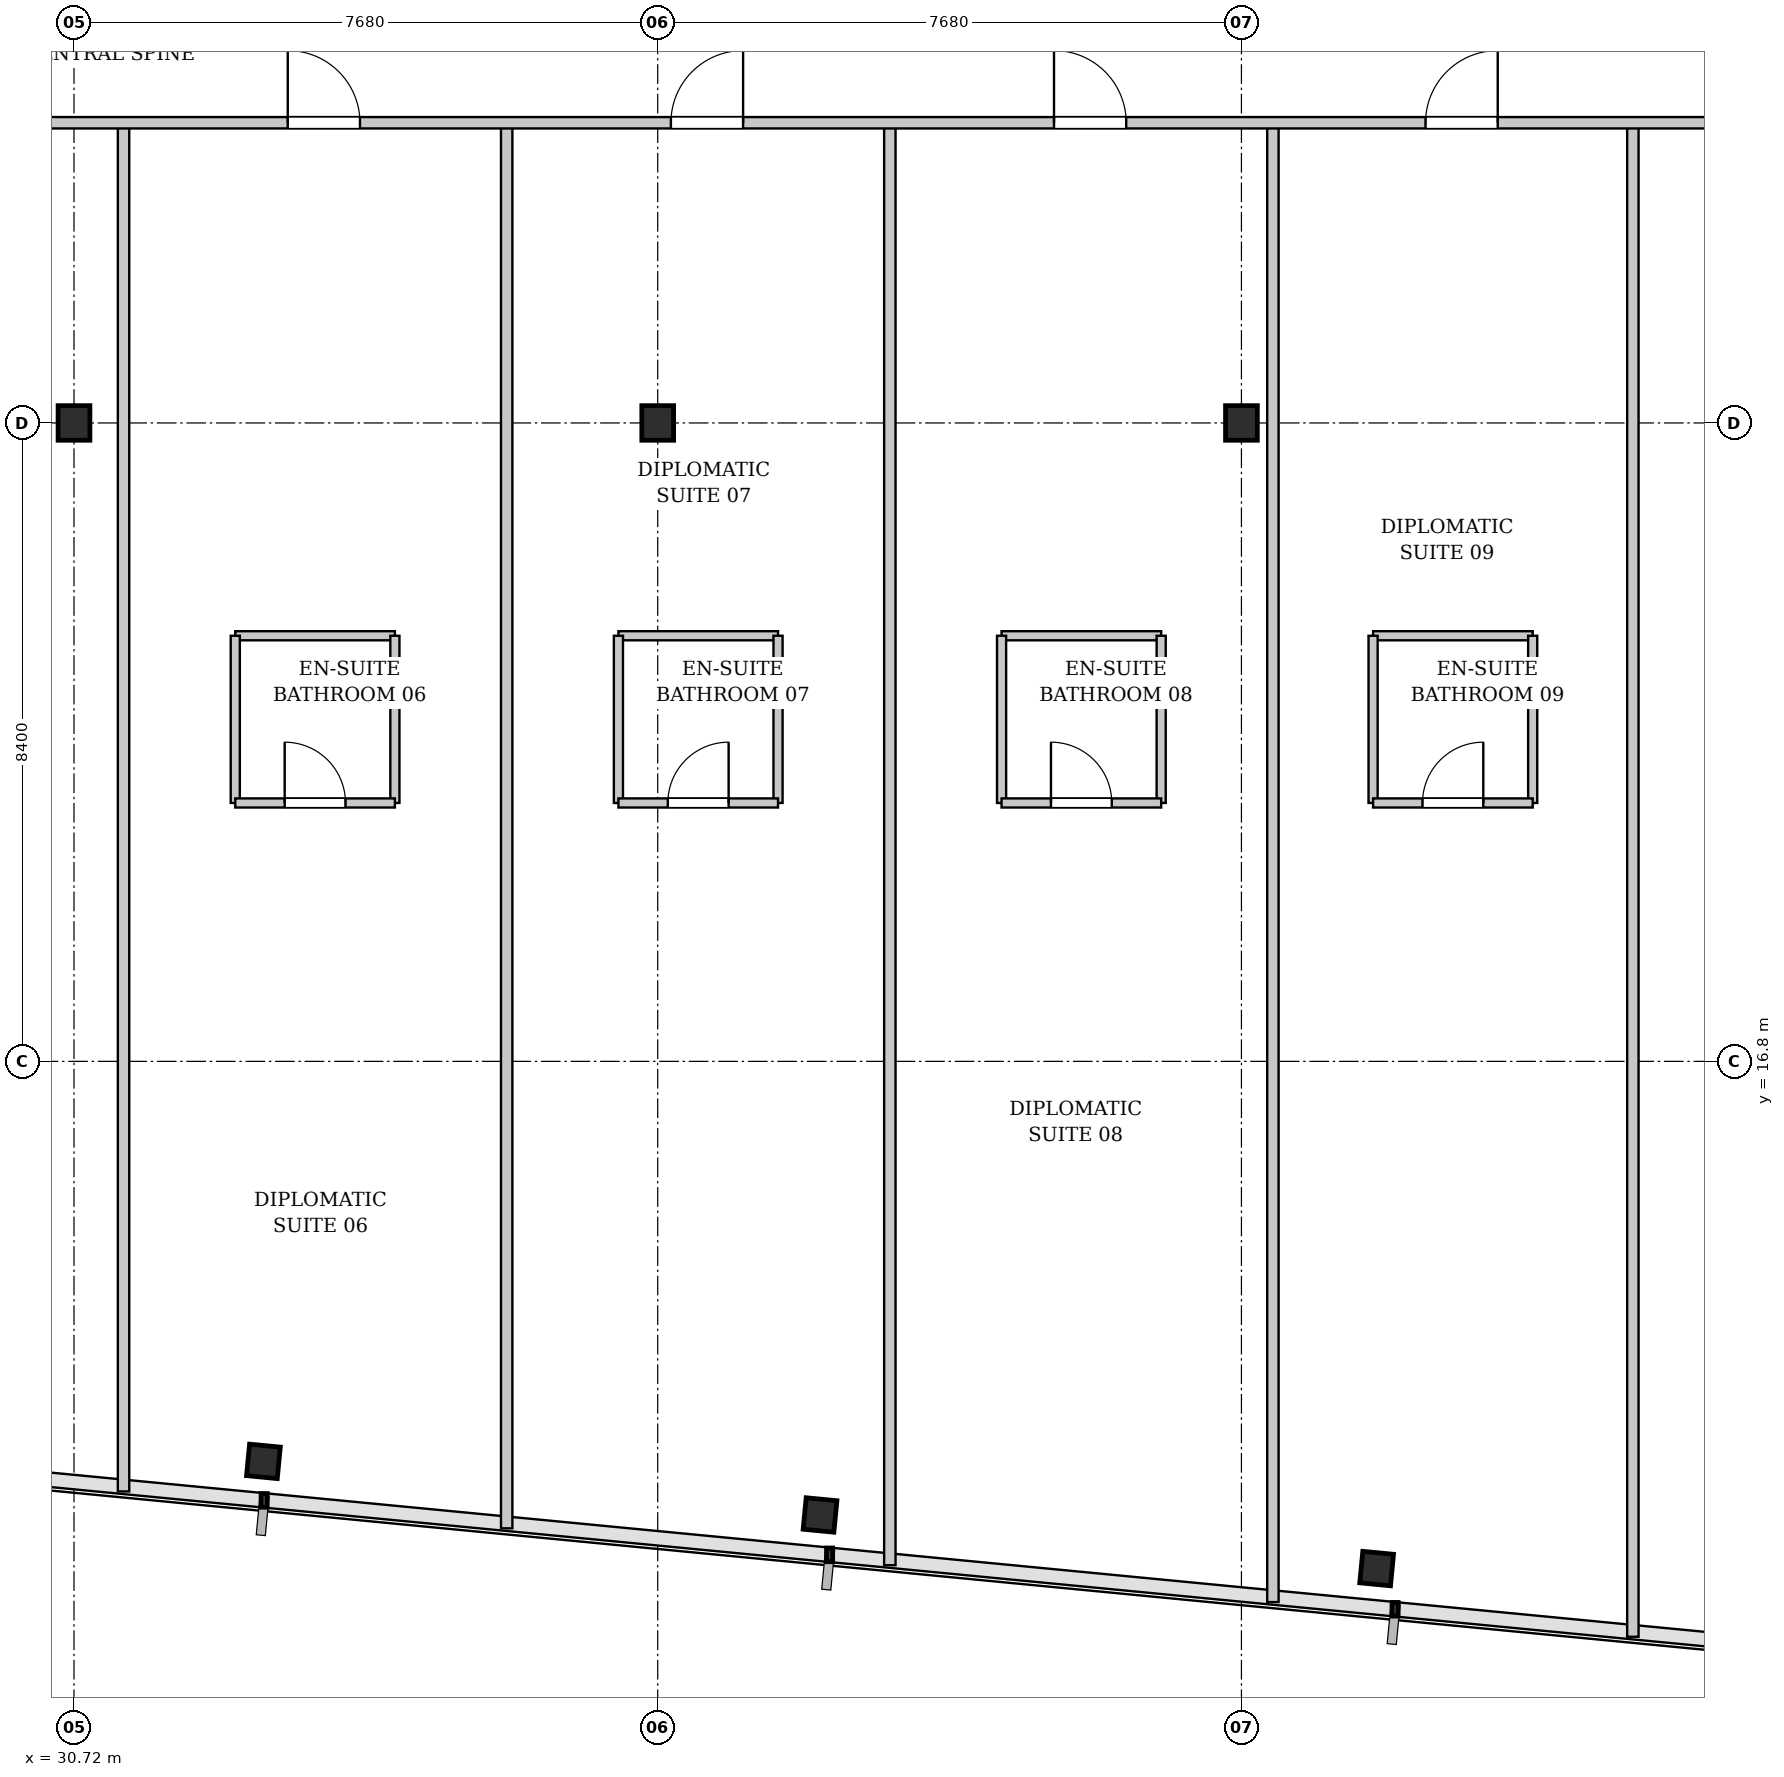
"""IFC4 building model, lengths in metres.
Left out: names, types, materials, properties, quantities, classifications, styles, units other than length and angle.
Written with IfcOpenShell. Run it as: python <this file> out.ifc"""

import sys

from ifc_helpers import new_model, si_unit, direction, frame, frame_2d, origin, origin_2d, place, context, subcontext, project, spatial, rectangle, i_section, extrude, element, fill, save


model = new_model("IFC4")
c1 = context("Model", 3, precision=1e-05, world=origin(), true_north=direction((0.0, 1.0)))
c2 = subcontext(c1, "Body", "Model", "MODEL_VIEW")
j1 = project(units=[si_unit("LENGTHUNIT", "METRE"), si_unit("PLANEANGLEUNIT", "RADIAN")], contexts=[c1])
p1 = place(None, origin())
s1 = spatial("IfcSite", under=j1, at=p1, CompositionType="ELEMENT")
p2 = place(p1, origin())
s2 = spatial("IfcBuilding", under=s1, at=p2, CompositionType="ELEMENT")
p3 = place(p2, frame((0.0, 0.0, 178.7)))
s3 = spatial("IfcBuildingStorey", under=s2, at=p3, CompositionType="ELEMENT", Elevation=178.7)
for number, where, z_axis, x_axis in (
    (1, (30.72, 25.2, 0.0), (0.0, 0.0, 1.0), (1.0, 0.0, 0.0)),
    (2, (38.4, 25.2, 0.0), (0.0, 0.0, 1.0), (1.0, 0.0, 0.0)),
    (3, (46.08, 25.2, 0.0), (0.0, 0.0, 1.0), (1.0, 0.0, 0.0)),
):
    element("IfcColumn", number, at=place(p3, frame(where, z_axis=z_axis, x_axis=x_axis)), inside=s3, PredefinedType="COLUMN", context=c2, shape_type="SweptSolid", body=[
        extrude(i_section(OverallWidth=0.418, OverallDepth=0.455, WebThickness=0.042, FlangeThickness=0.068, FilletRadius=0.015, at=origin_2d()), origin(), (0.0, 0.0, 1.0), 3.3),
    ])
for number, where, z_axis, x_axis in (
    (4, (33.212, 11.537, 0.0), (0.0, 0.0, 1.0), (0.995, -0.096, 0.0)),
    (5, (40.536, 10.832, 0.0), (0.0, 0.0, 1.0), (0.995, -0.096, 0.0)),
    (6, (47.859, 10.126, 0.0), (0.0, 0.0, 1.0), (0.995, -0.096, 0.0)),
):
    element("IfcColumn", number, at=place(p3, frame(where, z_axis=z_axis, x_axis=x_axis)), inside=s3, PredefinedType="COLUMN", context=c2, shape_type="SweptSolid", body=[
        extrude(i_section(OverallWidth=0.406, OverallDepth=0.416, WebThickness=0.03, FlangeThickness=0.048, FilletRadius=0.015, at=origin_2d()), origin(), (0.0, 0.0, 1.0), 3.3),
    ])
p4 = place(p3, frame((32.842, 22.4, 0.0), z_axis=(0.0, 0.0, 1.0), x_axis=(1.0, 0.0, 0.0)))
e7 = element("IfcWall", 7, at=p4, inside=s3, PredefinedType="PARTITIONING", context=c2, shape_type="SweptSolid", body=[
    extrude(rectangle(XDim=2.1, YDim=0.12, at=frame_2d((1.05, 0.0))), origin(), (0.0, 0.0, 1.0), 3.08),
])
for number, where, z_axis, x_axis in (
    (8, (32.842, 20.2, 0.0), (0.0, 0.0, 1.0), (0.0, 1.0, 0.0)),
    (9, (34.942, 20.2, 0.0), (0.0, 0.0, 1.0), (0.0, 1.0, 0.0)),
):
    element("IfcWall", number, at=place(p3, frame(where, z_axis=z_axis, x_axis=x_axis)), inside=s3, PredefinedType="PARTITIONING", context=c2, shape_type="SweptSolid", body=[
        extrude(rectangle(XDim=2.2, YDim=0.12, at=frame_2d((1.1, 0.0))), origin(), (0.0, 0.0, 1.0), 3.08),
    ])
p5 = place(p3, frame((32.842, 20.2, 0.0), z_axis=(0.0, 0.0, 1.0), x_axis=(1.0, 0.0, 0.0)))
e10 = element("IfcWall", 10, at=p5, inside=s3, PredefinedType="PARTITIONING", context=c2, shape_type="SweptSolid", body=[
    extrude(rectangle(XDim=2.1, YDim=0.12, at=frame_2d((1.05, 0.0))), origin(), (0.0, 0.0, 1.0), 3.08),
])
p6 = place(p5, frame((0.65, 0.0, 0.0)))
e11 = element("IfcOpeningElement", 11, at=p6, cuts=e10, PredefinedType="OPENING", context=c2, shape_type="SweptSolid", body=[
    extrude(rectangle(XDim=0.8, YDim=2.1, at=frame_2d((0.4, 1.05))), frame((0.0, 0.07, 0.0), z_axis=(0.0, -1.0, 0.0), x_axis=(1.0, 0.0, 0.0)), (0.0, 0.0, 1.0), 0.14),
])
p7 = place(p3, frame((31.372, 11.141, 0.0), z_axis=(0.0, 0.0, 1.0), x_axis=(0.0, 1.0, 0.0)))
e12 = element("IfcWall", 12, at=p7, inside=s3, PredefinedType="PARTITIONING", context=c2, shape_type="SweptSolid", body=[
    extrude(rectangle(XDim=18.029, YDim=0.15, at=frame_2d((9.014, 0.0))), origin(), (0.0, 0.0, 1.0), 2.475),
])
p8 = place(p3, frame((37.883, 22.4, 0.0), z_axis=(0.0, 0.0, 1.0), x_axis=(1.0, 0.0, 0.0)))
e13 = element("IfcWall", 13, at=p8, inside=s3, PredefinedType="PARTITIONING", context=c2, shape_type="SweptSolid", body=[
    extrude(rectangle(XDim=2.1, YDim=0.12, at=frame_2d((1.05, 0.0))), origin(), (0.0, 0.0, 1.0), 3.08),
])
for number, where, z_axis, x_axis in (
    (14, (37.883, 20.2, 0.0), (0.0, 0.0, 1.0), (0.0, 1.0, 0.0)),
    (15, (39.983, 20.2, 0.0), (0.0, 0.0, 1.0), (0.0, 1.0, 0.0)),
):
    element("IfcWall", number, at=place(p3, frame(where, z_axis=z_axis, x_axis=x_axis)), inside=s3, PredefinedType="PARTITIONING", context=c2, shape_type="SweptSolid", body=[
        extrude(rectangle(XDim=2.2, YDim=0.12, at=frame_2d((1.1, 0.0))), origin(), (0.0, 0.0, 1.0), 3.08),
    ])
p9 = place(p3, frame((37.883, 20.2, 0.0), z_axis=(0.0, 0.0, 1.0), x_axis=(1.0, 0.0, 0.0)))
e16 = element("IfcWall", 16, at=p9, inside=s3, PredefinedType="PARTITIONING", context=c2, shape_type="SweptSolid", body=[
    extrude(rectangle(XDim=2.1, YDim=0.12, at=frame_2d((1.05, 0.0))), origin(), (0.0, 0.0, 1.0), 3.08),
])
p10 = place(p9, frame((0.65, 0.0, 0.0)))
e17 = element("IfcOpeningElement", 17, at=p10, cuts=e16, PredefinedType="OPENING", context=c2, shape_type="SweptSolid", body=[
    extrude(rectangle(XDim=0.8, YDim=2.1, at=frame_2d((0.4, 1.05))), frame((0.0, 0.07, 0.0), z_axis=(0.0, -1.0, 0.0), x_axis=(1.0, 0.0, 0.0)), (0.0, 0.0, 1.0), 0.14),
])
p11 = place(p3, frame((36.413, 10.656, 0.0), z_axis=(0.0, 0.0, 1.0), x_axis=(0.0, 1.0, 0.0)))
e18 = element("IfcWall", 18, at=p11, inside=s3, PredefinedType="PARTITIONING", context=c2, shape_type="SweptSolid", body=[
    extrude(rectangle(XDim=18.514, YDim=0.15, at=frame_2d((9.257, 0.0))), origin(), (0.0, 0.0, 1.0), 3.08),
])
p12 = place(p3, frame((42.924, 22.4, 0.0), z_axis=(0.0, 0.0, 1.0), x_axis=(1.0, 0.0, 0.0)))
e19 = element("IfcWall", 19, at=p12, inside=s3, PredefinedType="PARTITIONING", context=c2, shape_type="SweptSolid", body=[
    extrude(rectangle(XDim=2.1, YDim=0.12, at=frame_2d((1.05, 0.0))), origin(), (0.0, 0.0, 1.0), 3.08),
])
for number, where, z_axis, x_axis in (
    (20, (42.924, 20.2, 0.0), (0.0, 0.0, 1.0), (0.0, 1.0, 0.0)),
    (21, (45.024, 20.2, 0.0), (0.0, 0.0, 1.0), (0.0, 1.0, 0.0)),
):
    element("IfcWall", number, at=place(p3, frame(where, z_axis=z_axis, x_axis=x_axis)), inside=s3, PredefinedType="PARTITIONING", context=c2, shape_type="SweptSolid", body=[
        extrude(rectangle(XDim=2.2, YDim=0.12, at=frame_2d((1.1, 0.0))), origin(), (0.0, 0.0, 1.0), 3.08),
    ])
p13 = place(p3, frame((42.924, 20.2, 0.0), z_axis=(0.0, 0.0, 1.0), x_axis=(1.0, 0.0, 0.0)))
e22 = element("IfcWall", 22, at=p13, inside=s3, PredefinedType="PARTITIONING", context=c2, shape_type="SweptSolid", body=[
    extrude(rectangle(XDim=2.1, YDim=0.12, at=frame_2d((1.05, 0.0))), origin(), (0.0, 0.0, 1.0), 3.08),
])
p14 = place(p13, frame((0.65, 0.0, 0.0)))
e23 = element("IfcOpeningElement", 23, at=p14, cuts=e22, PredefinedType="OPENING", context=c2, shape_type="SweptSolid", body=[
    extrude(rectangle(XDim=0.8, YDim=2.1, at=frame_2d((0.4, 1.05))), frame((0.0, 0.07, 0.0), z_axis=(0.0, -1.0, 0.0), x_axis=(1.0, 0.0, 0.0)), (0.0, 0.0, 1.0), 0.14),
])
p15 = place(p3, frame((41.454, 10.17, 0.0), z_axis=(0.0, 0.0, 1.0), x_axis=(0.0, 1.0, 0.0)))
e24 = element("IfcWall", 24, at=p15, inside=s3, PredefinedType="PARTITIONING", context=c2, shape_type="SweptSolid", body=[
    extrude(rectangle(XDim=19.0, YDim=0.15, at=frame_2d((9.5, 0.0))), origin(), (0.0, 0.0, 1.0), 3.08),
])
p16 = place(p3, frame((47.812, 22.4, 0.0), z_axis=(0.0, 0.0, 1.0), x_axis=(1.0, 0.0, 0.0)))
e25 = element("IfcWall", 25, at=p16, inside=s3, PredefinedType="PARTITIONING", context=c2, shape_type="SweptSolid", body=[
    extrude(rectangle(XDim=2.1, YDim=0.12, at=frame_2d((1.05, 0.0))), origin(), (0.0, 0.0, 1.0), 3.08),
])
for number, where, z_axis, x_axis in (
    (26, (47.812, 20.2, 0.0), (0.0, 0.0, 1.0), (0.0, 1.0, 0.0)),
    (27, (49.912, 20.2, 0.0), (0.0, 0.0, 1.0), (0.0, 1.0, 0.0)),
):
    element("IfcWall", number, at=place(p3, frame(where, z_axis=z_axis, x_axis=x_axis)), inside=s3, PredefinedType="PARTITIONING", context=c2, shape_type="SweptSolid", body=[
        extrude(rectangle(XDim=2.2, YDim=0.12, at=frame_2d((1.1, 0.0))), origin(), (0.0, 0.0, 1.0), 3.08),
    ])
p17 = place(p3, frame((47.812, 20.2, 0.0), z_axis=(0.0, 0.0, 1.0), x_axis=(1.0, 0.0, 0.0)))
e28 = element("IfcWall", 28, at=p17, inside=s3, PredefinedType="PARTITIONING", context=c2, shape_type="SweptSolid", body=[
    extrude(rectangle(XDim=2.1, YDim=0.12, at=frame_2d((1.05, 0.0))), origin(), (0.0, 0.0, 1.0), 3.08),
])
p18 = place(p17, frame((0.65, 0.0, 0.0)))
e29 = element("IfcOpeningElement", 29, at=p18, cuts=e28, PredefinedType="OPENING", context=c2, shape_type="SweptSolid", body=[
    extrude(rectangle(XDim=0.8, YDim=2.1, at=frame_2d((0.4, 1.05))), frame((0.0, 0.07, 0.0), z_axis=(0.0, -1.0, 0.0), x_axis=(1.0, 0.0, 0.0)), (0.0, 0.0, 1.0), 0.14),
])
p19 = place(p3, frame((46.494, 9.685, 0.0), z_axis=(0.0, 0.0, 1.0), x_axis=(0.0, 1.0, 0.0)))
e30 = element("IfcWall", 30, at=p19, inside=s3, PredefinedType="PARTITIONING", context=c2, shape_type="SweptSolid", body=[
    extrude(rectangle(XDim=19.485, YDim=0.15, at=frame_2d((9.742, 0.0))), origin(), (0.0, 0.0, 1.0), 2.475),
])
p20 = place(p3, frame((51.23, 9.229, 0.0), z_axis=(0.0, 0.0, 1.0), x_axis=(0.0, 1.0, 0.0)))
e31 = element("IfcWall", 31, at=p20, inside=s3, PredefinedType="PARTITIONING", context=c2, shape_type="SweptSolid", body=[
    extrude(rectangle(XDim=19.941, YDim=0.15, at=frame_2d((9.97, 0.0))), origin(), (0.0, 0.0, 1.0), 3.08),
])
p21 = place(p3, frame((2.46, 29.15, 0.0), z_axis=(0.0, 0.0, 1.0), x_axis=(1.0, 0.0, 0.0)))
e32 = element("IfcWall", 32, at=p21, inside=s3, PredefinedType="PARTITIONING", context=c2, shape_type="SweptSolid", body=[
    extrude(rectangle(XDim=57.505, YDim=0.15, at=frame_2d((28.752, 0.0))), origin(), (0.0, 0.0, 1.0), 2.475),
])
p22 = place(p21, frame((7.987, 0.0, 0.0)))
e33 = element("IfcOpeningElement", 33, at=p22, cuts=e32, PredefinedType="OPENING", context=c2, shape_type="SweptSolid", body=[
    extrude(rectangle(XDim=0.95, YDim=2.15, at=frame_2d((0.475, 1.075))), frame((0.0, 0.085, 0.0), z_axis=(0.0, -1.0, 0.0), x_axis=(1.0, 0.0, 0.0)), (0.0, 0.0, 1.0), 0.17),
])
p23 = place(p21, frame((11.483, 0.0, 0.0)))
e34 = element("IfcOpeningElement", 34, at=p23, cuts=e32, PredefinedType="OPENING", context=c2, shape_type="SweptSolid", body=[
    extrude(rectangle(XDim=0.95, YDim=2.15, at=frame_2d((0.475, 1.075))), frame((0.0, 0.085, 0.0), z_axis=(0.0, -1.0, 0.0), x_axis=(1.0, 0.0, 0.0)), (0.0, 0.0, 1.0), 0.17),
])
p24 = place(p21, frame((15.951, 0.0, 0.0)))
e35 = element("IfcOpeningElement", 35, at=p24, cuts=e32, PredefinedType="OPENING", context=c2, shape_type="SweptSolid", body=[
    extrude(rectangle(XDim=0.95, YDim=2.15, at=frame_2d((0.475, 1.075))), frame((0.0, 0.085, 0.0), z_axis=(0.0, -1.0, 0.0), x_axis=(1.0, 0.0, 0.0)), (0.0, 0.0, 1.0), 0.17),
])
p25 = place(p21, frame((20.991, 0.0, 0.0)))
e36 = element("IfcOpeningElement", 36, at=p25, cuts=e32, PredefinedType="OPENING", context=c2, shape_type="SweptSolid", body=[
    extrude(rectangle(XDim=0.95, YDim=2.15, at=frame_2d((0.475, 1.075))), frame((0.0, 0.085, 0.0), z_axis=(0.0, -1.0, 0.0), x_axis=(1.0, 0.0, 0.0)), (0.0, 0.0, 1.0), 0.17),
])
p26 = place(p21, frame((26.032, 0.0, 0.0)))
e37 = element("IfcOpeningElement", 37, at=p26, cuts=e32, PredefinedType="OPENING", context=c2, shape_type="SweptSolid", body=[
    extrude(rectangle(XDim=0.95, YDim=2.15, at=frame_2d((0.475, 1.075))), frame((0.0, 0.085, 0.0), z_axis=(0.0, -1.0, 0.0), x_axis=(1.0, 0.0, 0.0)), (0.0, 0.0, 1.0), 0.17),
])
p27 = place(p21, frame((31.072, 0.0, 0.0)))
e38 = element("IfcOpeningElement", 38, at=p27, cuts=e32, PredefinedType="OPENING", context=c2, shape_type="SweptSolid", body=[
    extrude(rectangle(XDim=0.95, YDim=2.15, at=frame_2d((0.475, 1.075))), frame((0.0, 0.085, 0.0), z_axis=(0.0, -1.0, 0.0), x_axis=(1.0, 0.0, 0.0)), (0.0, 0.0, 1.0), 0.17),
])
p28 = place(p21, frame((36.113, 0.0, 0.0)))
e39 = element("IfcOpeningElement", 39, at=p28, cuts=e32, PredefinedType="OPENING", context=c2, shape_type="SweptSolid", body=[
    extrude(rectangle(XDim=0.95, YDim=2.15, at=frame_2d((0.475, 1.075))), frame((0.0, 0.085, 0.0), z_axis=(0.0, -1.0, 0.0), x_axis=(1.0, 0.0, 0.0)), (0.0, 0.0, 1.0), 0.17),
])
p29 = place(p21, frame((41.154, 0.0, 0.0)))
e40 = element("IfcOpeningElement", 40, at=p29, cuts=e32, PredefinedType="OPENING", context=c2, shape_type="SweptSolid", body=[
    extrude(rectangle(XDim=0.95, YDim=2.15, at=frame_2d((0.475, 1.075))), frame((0.0, 0.085, 0.0), z_axis=(0.0, -1.0, 0.0), x_axis=(1.0, 0.0, 0.0)), (0.0, 0.0, 1.0), 0.17),
])
p30 = place(p21, frame((46.042, 0.0, 0.0)))
e41 = element("IfcOpeningElement", 41, at=p30, cuts=e32, PredefinedType="OPENING", context=c2, shape_type="SweptSolid", body=[
    extrude(rectangle(XDim=0.95, YDim=2.15, at=frame_2d((0.475, 1.075))), frame((0.0, 0.085, 0.0), z_axis=(0.0, -1.0, 0.0), x_axis=(1.0, 0.0, 0.0)), (0.0, 0.0, 1.0), 0.17),
])
p31 = place(p21, frame((50.377, 0.0, 0.0)))
e42 = element("IfcOpeningElement", 42, at=p31, cuts=e32, PredefinedType="OPENING", context=c2, shape_type="SweptSolid", body=[
    extrude(rectangle(XDim=0.95, YDim=2.15, at=frame_2d((0.475, 1.075))), frame((0.0, 0.085, 0.0), z_axis=(0.0, -1.0, 0.0), x_axis=(1.0, 0.0, 0.0)), (0.0, 0.0, 1.0), 0.17),
])
p32 = place(p6, origin())
e43 = element("IfcDoor", 43, at=p32, inside=s3, OperationType="SINGLE_SWING_LEFT", PredefinedType="DOOR", context=c2, shape_type="SweptSolid", body=[
    extrude(rectangle(XDim=0.8, YDim=2.1, at=frame_2d((0.4, 1.05))), frame((0.0, 0.025, 0.0), z_axis=(0.0, -1.0, 0.0), x_axis=(1.0, 0.0, 0.0)), (0.0, 0.0, 1.0), 0.05),
])
fill(e11, e43)
p33 = place(p10, origin())
e44 = element("IfcDoor", 44, at=p33, inside=s3, OperationType="SINGLE_SWING_RIGHT", PredefinedType="DOOR", context=c2, shape_type="SweptSolid", body=[
    extrude(rectangle(XDim=0.8, YDim=2.1, at=frame_2d((0.4, 1.05))), frame((0.0, 0.025, 0.0), z_axis=(0.0, -1.0, 0.0), x_axis=(1.0, 0.0, 0.0)), (0.0, 0.0, 1.0), 0.05),
])
fill(e17, e44)
p34 = place(p14, origin())
e45 = element("IfcDoor", 45, at=p34, inside=s3, OperationType="SINGLE_SWING_LEFT", PredefinedType="DOOR", context=c2, shape_type="SweptSolid", body=[
    extrude(rectangle(XDim=0.8, YDim=2.1, at=frame_2d((0.4, 1.05))), frame((0.0, 0.025, 0.0), z_axis=(0.0, -1.0, 0.0), x_axis=(1.0, 0.0, 0.0)), (0.0, 0.0, 1.0), 0.05),
])
fill(e23, e45)
p35 = place(p18, origin())
e46 = element("IfcDoor", 46, at=p35, inside=s3, OperationType="SINGLE_SWING_RIGHT", PredefinedType="DOOR", context=c2, shape_type="SweptSolid", body=[
    extrude(rectangle(XDim=0.8, YDim=2.1, at=frame_2d((0.4, 1.05))), frame((0.0, 0.025, 0.0), z_axis=(0.0, -1.0, 0.0), x_axis=(1.0, 0.0, 0.0)), (0.0, 0.0, 1.0), 0.05),
])
fill(e29, e46)
p36 = place(p27, origin())
e47 = element("IfcDoor", 47, at=p36, inside=s3, OperationType="SINGLE_SWING_LEFT", PredefinedType="DOOR", context=c2, shape_type="SweptSolid", body=[
    extrude(rectangle(XDim=0.95, YDim=2.15, at=frame_2d((0.475, 1.075))), frame((0.0, 0.025, 0.0), z_axis=(0.0, -1.0, 0.0), x_axis=(1.0, 0.0, 0.0)), (0.0, 0.0, 1.0), 0.05),
])
fill(e38, e47)
p37 = place(p28, origin())
e48 = element("IfcDoor", 48, at=p37, inside=s3, OperationType="SINGLE_SWING_RIGHT", PredefinedType="DOOR", context=c2, shape_type="SweptSolid", body=[
    extrude(rectangle(XDim=0.95, YDim=2.15, at=frame_2d((0.475, 1.075))), frame((0.0, 0.025, 0.0), z_axis=(0.0, -1.0, 0.0), x_axis=(1.0, 0.0, 0.0)), (0.0, 0.0, 1.0), 0.05),
])
fill(e39, e48)
p38 = place(p29, origin())
e49 = element("IfcDoor", 49, at=p38, inside=s3, OperationType="SINGLE_SWING_LEFT", PredefinedType="DOOR", context=c2, shape_type="SweptSolid", body=[
    extrude(rectangle(XDim=0.95, YDim=2.15, at=frame_2d((0.475, 1.075))), frame((0.0, 0.025, 0.0), z_axis=(0.0, -1.0, 0.0), x_axis=(1.0, 0.0, 0.0)), (0.0, 0.0, 1.0), 0.05),
])
fill(e40, e49)
p39 = place(p30, origin())
e50 = element("IfcDoor", 50, at=p39, inside=s3, OperationType="SINGLE_SWING_RIGHT", PredefinedType="DOOR", context=c2, shape_type="SweptSolid", body=[
    extrude(rectangle(XDim=0.95, YDim=2.15, at=frame_2d((0.475, 1.075))), frame((0.0, 0.025, 0.0), z_axis=(0.0, -1.0, 0.0), x_axis=(1.0, 0.0, 0.0)), (0.0, 0.0, 1.0), 0.05),
])
fill(e41, e50)
save(model, sys.argv[1])
